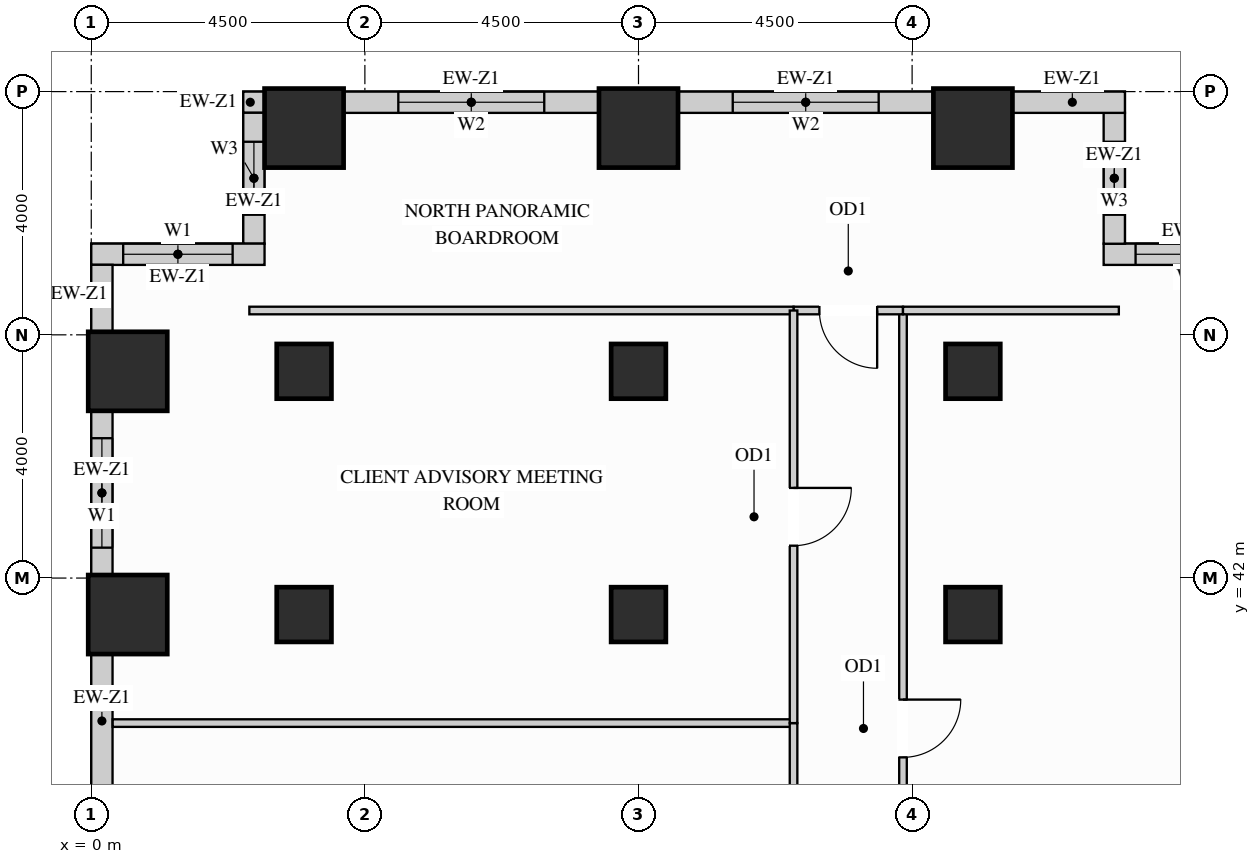
"""IFC4 building model, lengths in metres.
Left out: names, types, materials, properties, quantities, classifications, styles, units other than length and angle.
Written with IfcOpenShell. Run it as: python <this file> out.ifc"""

import sys

from ifc_helpers import new_model, si_unit, direction, frame, frame_2d, origin, origin_2d, place, context, subcontext, project, spatial, rectangle, extrude, source, transform, mapped, element, fill, save


model = new_model("IFC4")
c1 = context("Model", 3, precision=1e-05, world=origin(), true_north=direction((0.0, 1.0)))
c2 = subcontext(c1, "Body", "Model", "MODEL_VIEW")
j1 = project(units=[si_unit("LENGTHUNIT", "METRE"), si_unit("PLANEANGLEUNIT", "RADIAN")], contexts=[c1])
p1 = place(None, origin())
s1 = spatial("IfcSite", under=j1, at=p1, CompositionType="ELEMENT")
p2 = place(p1, origin())
s2 = spatial("IfcBuilding", under=s1, at=p2, CompositionType="ELEMENT")
p3 = place(p2, frame((0.0, 0.0, 62.1)))
s3 = spatial("IfcBuildingStorey", under=s2, at=p3, CompositionType="ELEMENT", Elevation=62.1)
m1 = source(origin(), c2, "Body", "SweptSolid", [
    extrude(rectangle(XDim=0.9, YDim=0.9, at=origin_2d()), origin(), (0.0, 0.0, 1.0), 3.38),
])
for number, where, z_axis, x_axis in (
    (1, (14.5, 41.4, 0.0), (0.0, 0.0, 1.0), (1.0, 0.0, 0.0)),
    (2, (14.5, 45.4, 0.0), (0.0, 0.0, 1.0), (1.0, 0.0, 0.0)),
    (3, (3.5, 41.4, 0.0), (0.0, 0.0, 1.0), (1.0, 0.0, 0.0)),
    (4, (3.5, 45.4, 0.0), (0.0, 0.0, 1.0), (1.0, 0.0, 0.0)),
    (5, (9.0, 41.4, 0.0), (0.0, 0.0, 1.0), (1.0, 0.0, 0.0)),
    (6, (9.0, 45.4, 0.0), (0.0, 0.0, 1.0), (1.0, 0.0, 0.0)),
):
    element("IfcColumn", number, at=place(p3, frame(where, z_axis=z_axis, x_axis=x_axis)), inside=s3, PredefinedType="COLUMN", context=c2, shape_type="MappedRepresentation", body=[
        mapped(m1, transform((0.0, 0.0, 0.0), x_axis=(1.0, 0.0, 0.0), y_axis=(0.0, 1.0, 0.0), z_axis=(0.0, 0.0, 1.0))),
    ])
m2 = source(origin(), c2, "Body", "SweptSolid", [
    extrude(rectangle(XDim=1.3, YDim=1.3, at=origin_2d()), origin(), (0.0, 0.0, 1.0), 3.38),
])
for number, where, z_axis, x_axis in (
    (7, (14.5, 49.4, 0.0), (0.0, 0.0, 1.0), (1.0, 0.0, 0.0)),
    (8, (3.5, 49.4, 0.0), (0.0, 0.0, 1.0), (1.0, 0.0, 0.0)),
    (9, (9.0, 49.4, 0.0), (0.0, 0.0, 1.0), (1.0, 0.0, 0.0)),
    (10, (0.6, 41.4, 0.0), (0.0, 0.0, 1.0), (1.0, 0.0, 0.0)),
    (11, (0.6, 45.4, 0.0), (0.0, 0.0, 1.0), (1.0, 0.0, 0.0)),
):
    element("IfcColumn", number, at=place(p3, frame(where, z_axis=z_axis, x_axis=x_axis)), inside=s3, PredefinedType="COLUMN", context=c2, shape_type="MappedRepresentation", body=[
        mapped(m2, transform((0.0, 0.0, 0.0), x_axis=(1.0, 0.0, 0.0), y_axis=(0.0, 1.0, 0.0), z_axis=(0.0, 0.0, 1.0))),
    ])
p4 = place(p3, frame((19.5, 47.325, 0.0), z_axis=(0.0, 0.0, 1.0), x_axis=(-1.0, 0.0, 0.0)))
e12 = element("IfcWall", 12, at=p4, inside=s3, PredefinedType="SOLIDWALL", context=c2, shape_type="SweptSolid", body=[
    extrude(rectangle(XDim=2.85, YDim=0.35, at=frame_2d((1.425, 0.0))), origin(), (0.0, 0.0, 1.0), 3.365),
])
p5 = place(p4, frame((0.525, 0.0, 0.78)))
e13 = element("IfcOpeningElement", 13, at=p5, cuts=e12, PredefinedType="OPENING", context=c2, shape_type="SweptSolid", body=[
    extrude(rectangle(XDim=1.8, YDim=2.1, at=frame_2d((0.9, 1.05))), frame((0.0, 0.185, 0.0), z_axis=(0.0, -1.0, 0.0), x_axis=(1.0, 0.0, 0.0)), (0.0, 0.0, 1.0), 0.37),
])
p6 = place(p3, frame((16.825, 47.498, 0.0), z_axis=(0.0, 0.0, 1.0), x_axis=(0.0, 1.0, 0.0)))
e14 = element("IfcWall", 14, at=p6, inside=s3, PredefinedType="SOLIDWALL", context=c2, shape_type="SweptSolid", body=[
    extrude(rectangle(XDim=2.154, YDim=0.35, at=frame_2d((1.077, 0.0))), origin(), (0.0, 0.0, 1.0), 3.365),
])
p7 = place(p6, frame((0.477, 0.0, 0.78)))
e15 = element("IfcOpeningElement", 15, at=p7, cuts=e14, PredefinedType="OPENING", context=c2, shape_type="SweptSolid", body=[
    extrude(rectangle(XDim=1.2, YDim=2.1, at=frame_2d((0.6, 1.05))), frame((0.0, 0.185, 0.0), z_axis=(0.0, -1.0, 0.0), x_axis=(1.0, 0.0, 0.0)), (0.0, 0.0, 1.0), 0.37),
])
m3 = source(origin(), c2, "Body", "SweptSolid", [
    extrude(rectangle(XDim=1.852, YDim=0.35, at=frame_2d((0.926, 0.0))), origin(), (0.0, 0.0, 1.0), 3.365),
])
p8 = place(p3, frame((17.0, 49.825, 0.0), z_axis=(0.0, 0.0, 1.0), x_axis=(-1.0, 0.0, 0.0)))
e16 = element("IfcWall", 16, at=p8, inside=s3, PredefinedType="SOLIDWALL", context=c2, shape_type="MappedRepresentation", body=[
    mapped(m3, transform((0.0, 0.0, 0.0), x_axis=(1.0, 0.0, 0.0), y_axis=(0.0, 1.0, 0.0), z_axis=(0.0, 0.0, 1.0))),
])
p9 = place(p3, frame((13.852, 49.825, 0.0), z_axis=(0.0, 0.0, 1.0), x_axis=(-1.0, 0.0, 0.0)))
e17 = element("IfcWall", 17, at=p9, inside=s3, PredefinedType="SOLIDWALL", context=c2, shape_type="SweptSolid", body=[
    extrude(rectangle(XDim=4.204, YDim=0.35, at=frame_2d((2.102, 0.0))), origin(), (0.0, 0.0, 1.0), 2.51),
])
p10 = place(p9, frame((0.902, 0.0, 0.78)))
e18 = element("IfcOpeningElement", 18, at=p10, cuts=e17, PredefinedType="OPENING", context=c2, shape_type="SweptSolid", body=[
    extrude(rectangle(XDim=2.4, YDim=1.55, at=frame_2d((1.2, 0.775))), frame((0.0, 0.185, 0.0), z_axis=(0.0, -1.0, 0.0), x_axis=(1.0, 0.0, 0.0)), (0.0, 0.0, 1.0), 0.37),
])
p11 = place(p3, frame((8.352, 49.825, 0.0), z_axis=(0.0, 0.0, 1.0), x_axis=(-1.0, 0.0, 0.0)))
e19 = element("IfcWall", 19, at=p11, inside=s3, PredefinedType="SOLIDWALL", context=c2, shape_type="SweptSolid", body=[
    extrude(rectangle(XDim=4.204, YDim=0.35, at=frame_2d((2.102, 0.0))), origin(), (0.0, 0.0, 1.0), 2.51),
])
p12 = place(p11, frame((0.902, 0.0, 0.78)))
e20 = element("IfcOpeningElement", 20, at=p12, cuts=e19, PredefinedType="OPENING", context=c2, shape_type="SweptSolid", body=[
    extrude(rectangle(XDim=2.4, YDim=1.55, at=frame_2d((1.2, 0.775))), frame((0.0, 0.185, 0.0), z_axis=(0.0, -1.0, 0.0), x_axis=(1.0, 0.0, 0.0)), (0.0, 0.0, 1.0), 0.37),
])
m4 = source(origin(), c2, "Body", "SweptSolid", [
    extrude(rectangle(XDim=0.352, YDim=0.35, at=frame_2d((0.176, 0.0))), origin(), (0.0, 0.0, 1.0), 3.365),
])
p13 = place(p3, frame((2.852, 49.825, 0.0), z_axis=(0.0, 0.0, 1.0), x_axis=(-1.0, 0.0, 0.0)))
e21 = element("IfcWall", 21, at=p13, inside=s3, PredefinedType="SOLIDWALL", context=c2, shape_type="MappedRepresentation", body=[
    mapped(m4, transform((0.0, 0.0, 0.0), x_axis=(1.0, 0.0, 0.0), y_axis=(0.0, 1.0, 0.0), z_axis=(0.0, 0.0, 1.0))),
])
p14 = place(p3, frame((2.675, 49.652, 0.0), z_axis=(0.0, 0.0, 1.0), x_axis=(0.0, -1.0, 0.0)))
e22 = element("IfcWall", 22, at=p14, inside=s3, PredefinedType="SOLIDWALL", context=c2, shape_type="SweptSolid", body=[
    extrude(rectangle(XDim=2.154, YDim=0.35, at=frame_2d((1.077, 0.0))), origin(), (0.0, 0.0, 1.0), 3.365),
])
p15 = place(p14, frame((0.477, 0.0, 0.78)))
e23 = element("IfcOpeningElement", 23, at=p15, cuts=e22, PredefinedType="OPENING", context=c2, shape_type="SweptSolid", body=[
    extrude(rectangle(XDim=1.2, YDim=2.1, at=frame_2d((0.6, 1.05))), frame((0.0, 0.185, 0.0), z_axis=(0.0, -1.0, 0.0), x_axis=(1.0, 0.0, 0.0)), (0.0, 0.0, 1.0), 0.37),
])
p16 = place(p3, frame((2.85, 47.325, 0.0), z_axis=(0.0, 0.0, 1.0), x_axis=(-1.0, 0.0, 0.0)))
e24 = element("IfcWall", 24, at=p16, inside=s3, PredefinedType="SOLIDWALL", context=c2, shape_type="SweptSolid", body=[
    extrude(rectangle(XDim=2.85, YDim=0.35, at=frame_2d((1.425, 0.0))), origin(), (0.0, 0.0, 1.0), 3.365),
])
p17 = place(p16, frame((0.525, 0.0, 0.78)))
e25 = element("IfcOpeningElement", 25, at=p17, cuts=e24, PredefinedType="OPENING", context=c2, shape_type="SweptSolid", body=[
    extrude(rectangle(XDim=1.8, YDim=2.1, at=frame_2d((0.9, 1.05))), frame((0.0, 0.185, 0.0), z_axis=(0.0, -1.0, 0.0), x_axis=(1.0, 0.0, 0.0)), (0.0, 0.0, 1.0), 0.37),
])
m5 = source(origin(), c2, "Body", "SweptSolid", [
    extrude(rectangle(XDim=1.104, YDim=0.35, at=frame_2d((0.552, 0.0))), origin(), (0.0, 0.0, 1.0), 3.365),
])
p18 = place(p3, frame((0.175, 47.152, 0.0), z_axis=(0.0, 0.0, 1.0), x_axis=(0.0, -1.0, 0.0)))
e26 = element("IfcWall", 26, at=p18, inside=s3, PredefinedType="SOLIDWALL", context=c2, shape_type="MappedRepresentation", body=[
    mapped(m5, transform((0.0, 0.0, 0.0), x_axis=(1.0, 0.0, 0.0), y_axis=(0.0, 1.0, 0.0), z_axis=(0.0, 0.0, 1.0))),
])
p19 = place(p3, frame((0.175, 44.752, 0.0), z_axis=(0.0, 0.0, 1.0), x_axis=(0.0, -1.0, 0.0)))
e27 = element("IfcWall", 27, at=p19, inside=s3, PredefinedType="SOLIDWALL", context=c2, shape_type="SweptSolid", body=[
    extrude(rectangle(XDim=2.704, YDim=0.35, at=frame_2d((1.352, 0.0))), origin(), (0.0, 0.0, 1.0), 2.51),
])
p20 = place(p19, frame((0.452, 0.0, 0.78)))
e28 = element("IfcOpeningElement", 28, at=p20, cuts=e27, PredefinedType="OPENING", context=c2, shape_type="SweptSolid", body=[
    extrude(rectangle(XDim=1.8, YDim=1.55, at=frame_2d((0.9, 0.775))), frame((0.0, 0.185, 0.0), z_axis=(0.0, -1.0, 0.0), x_axis=(1.0, 0.0, 0.0)), (0.0, 0.0, 1.0), 0.37),
])
m6 = source(origin(), c2, "Body", "SweptSolid", [
    extrude(rectangle(XDim=2.204, YDim=0.35, at=frame_2d((1.102, 0.0))), origin(), (0.0, 0.0, 1.0), 2.51),
])
p21 = place(p3, frame((0.175, 40.752, 0.0), z_axis=(0.0, 0.0, 1.0), x_axis=(0.0, -1.0, 0.0)))
e29 = element("IfcWall", 29, at=p21, inside=s3, PredefinedType="SOLIDWALL", context=c2, shape_type="MappedRepresentation", body=[
    mapped(m6, transform((0.0, 0.0, 0.0), x_axis=(1.0, 0.0, 0.0), y_axis=(0.0, 1.0, 0.0), z_axis=(0.0, 0.0, 1.0))),
])
m7 = source(origin(), c2, "Body", "SweptSolid", [
    extrude(rectangle(XDim=11.198, YDim=0.125, at=frame_2d((5.599, 0.0))), origin(), (0.0, 0.0, 1.0), 2.828),
])
p22 = place(p3, frame((0.352, 39.615, 0.0), z_axis=(0.0, 0.0, 1.0), x_axis=(1.0, 0.0, 0.0)))
e30 = element("IfcWall", 30, at=p22, inside=s3, PredefinedType="PARTITIONING", context=c2, shape_type="MappedRepresentation", body=[
    mapped(m7, transform((0.0, 0.0, 0.0), x_axis=(1.0, 0.0, 0.0), y_axis=(0.0, 1.0, 0.0), z_axis=(0.0, 0.0, 1.0))),
])
p23 = place(p3, frame((13.35, 31.65, 0.0), z_axis=(0.0, 0.0, 1.0), x_axis=(0.0, 1.0, 0.0)))
e31 = element("IfcWall", 31, at=p23, inside=s3, PredefinedType="PARTITIONING", context=c2, shape_type="SweptSolid", body=[
    extrude(rectangle(XDim=14.75, YDim=0.125, at=frame_2d((7.375, 0.0))), origin(), (0.0, 0.0, 1.0), 3.365),
])
p24 = place(p23, frame((7.402, 0.0, 0.0)))
e32 = element("IfcOpeningElement", 32, at=p24, cuts=e31, PredefinedType="OPENING", context=c2, shape_type="SweptSolid", body=[
    extrude(rectangle(XDim=0.95, YDim=2.15, at=frame_2d((0.475, 1.075))), frame((0.0, 0.073, 0.0), z_axis=(0.0, -1.0, 0.0), x_axis=(1.0, 0.0, 0.0)), (0.0, 0.0, 1.0), 0.145),
])
p25 = place(p3, frame((11.55, 46.4, 0.0), z_axis=(0.0, 0.0, 1.0), x_axis=(1.0, 0.0, 0.0)))
e33 = element("IfcWall", 33, at=p25, inside=s3, PredefinedType="PARTITIONING", context=c2, shape_type="SweptSolid", body=[
    extrude(rectangle(XDim=1.8, YDim=0.125, at=frame_2d((0.9, 0.0))), origin(), (0.0, 0.0, 1.0), 3.365),
])
p26 = place(p25, frame((0.425, 0.0, 0.0)))
e34 = element("IfcOpeningElement", 34, at=p26, cuts=e33, PredefinedType="OPENING", context=c2, shape_type="SweptSolid", body=[
    extrude(rectangle(XDim=0.95, YDim=2.15, at=frame_2d((0.475, 1.075))), frame((0.0, 0.073, 0.0), z_axis=(0.0, -1.0, 0.0), x_axis=(1.0, 0.0, 0.0)), (0.0, 0.0, 1.0), 0.145),
])
m8 = source(origin(), c2, "Body", "SweptSolid", [
    extrude(rectangle(XDim=3.55, YDim=0.125, at=frame_2d((1.775, 0.0))), origin(), (0.0, 0.0, 1.0), 3.365),
])
p27 = place(p3, frame((13.35, 46.4, 0.0), z_axis=(0.0, 0.0, 1.0), x_axis=(1.0, 0.0, 0.0)))
e35 = element("IfcWall", 35, at=p27, inside=s3, PredefinedType="PARTITIONING", context=c2, shape_type="MappedRepresentation", body=[
    mapped(m8, transform((0.0, 0.0, 0.0), x_axis=(1.0, 0.0, 0.0), y_axis=(0.0, 1.0, 0.0), z_axis=(0.0, 0.0, 1.0))),
])
m9 = source(origin(), c2, "Body", "SweptSolid", [
    extrude(rectangle(XDim=8.95, YDim=0.125, at=frame_2d((4.475, 0.0))), origin(), (0.0, 0.0, 1.0), 3.365),
])
p28 = place(p3, frame((2.6, 46.4, 0.0), z_axis=(0.0, 0.0, 1.0), x_axis=(1.0, 0.0, 0.0)))
e36 = element("IfcWall", 36, at=p28, inside=s3, PredefinedType="PARTITIONING", context=c2, shape_type="MappedRepresentation", body=[
    mapped(m9, transform((0.0, 0.0, 0.0), x_axis=(1.0, 0.0, 0.0), y_axis=(0.0, 1.0, 0.0), z_axis=(0.0, 0.0, 1.0))),
])
p29 = place(p3, frame((11.55, 31.65, 0.0), z_axis=(0.0, 0.0, 1.0), x_axis=(0.0, 1.0, 0.0)))
e37 = element("IfcWall", 37, at=p29, inside=s3, PredefinedType="PARTITIONING", context=c2, shape_type="SweptSolid", body=[
    extrude(rectangle(XDim=7.965, YDim=0.125, at=frame_2d((3.982, 0.0))), origin(), (0.0, 0.0, 1.0), 3.365),
])
p30 = place(p29, frame((3.508, 0.0, 0.0)))
e38 = element("IfcOpeningElement", 38, at=p30, cuts=e37, PredefinedType="OPENING", context=c2, shape_type="SweptSolid", body=[
    extrude(rectangle(XDim=0.95, YDim=2.15, at=frame_2d((0.475, 1.075))), frame((0.0, 0.073, 0.0), z_axis=(0.0, -1.0, 0.0), x_axis=(1.0, 0.0, 0.0)), (0.0, 0.0, 1.0), 0.145),
])
p31 = place(p3, frame((11.55, 39.615, 0.0), z_axis=(0.0, 0.0, 1.0), x_axis=(0.0, 1.0, 0.0)))
e39 = element("IfcWall", 39, at=p31, inside=s3, PredefinedType="PARTITIONING", context=c2, shape_type="SweptSolid", body=[
    extrude(rectangle(XDim=6.785, YDim=0.125, at=frame_2d((3.393, 0.0))), origin(), (0.0, 0.0, 1.0), 3.365),
])
p32 = place(p31, frame((2.917, 0.0, 0.0)))
e40 = element("IfcOpeningElement", 40, at=p32, cuts=e39, PredefinedType="OPENING", context=c2, shape_type="SweptSolid", body=[
    extrude(rectangle(XDim=0.95, YDim=2.15, at=frame_2d((0.475, 1.075))), frame((0.0, 0.073, 0.0), z_axis=(0.0, -1.0, 0.0), x_axis=(1.0, 0.0, 0.0)), (0.0, 0.0, 1.0), 0.145),
])
m10 = source(origin(), c2, "Body", "SweptSolid", [
    extrude(rectangle(XDim=0.95, YDim=2.15, at=frame_2d((0.475, 1.075))), frame((0.0, 0.025, 0.0), z_axis=(0.0, -1.0, 0.0), x_axis=(1.0, 0.0, 0.0)), (0.0, 0.0, 1.0), 0.05),
])
p33 = place(p24, origin())
e41 = element("IfcDoor", 41, at=p33, inside=s3, OperationType="SINGLE_SWING_RIGHT", PredefinedType="DOOR", context=c2, shape_type="MappedRepresentation", body=[
    mapped(m10, transform((0.0, 0.0, 0.0), x_axis=(1.0, 0.0, 0.0), y_axis=(0.0, 1.0, 0.0), z_axis=(0.0, 0.0, 1.0))),
])
fill(e32, e41)
p34 = place(p26, origin())
e42 = element("IfcDoor", 42, at=p34, inside=s3, OperationType="SINGLE_SWING_RIGHT", PredefinedType="DOOR", context=c2, shape_type="MappedRepresentation", body=[
    mapped(m10, transform((0.0, 0.0, 0.0), x_axis=(1.0, 0.0, 0.0), y_axis=(0.0, 1.0, 0.0), z_axis=(0.0, 0.0, 1.0))),
])
fill(e34, e42)
p35 = place(p32, origin())
e43 = element("IfcDoor", 43, at=p35, inside=s3, OperationType="SINGLE_SWING_RIGHT", PredefinedType="DOOR", context=c2, shape_type="MappedRepresentation", body=[
    mapped(m10, transform((0.0, 0.0, 0.0), x_axis=(1.0, 0.0, 0.0), y_axis=(0.0, 1.0, 0.0), z_axis=(0.0, 0.0, 1.0))),
])
fill(e40, e43)
m11 = source(origin(), c2, "Body", "SweptSolid", [
    extrude(rectangle(XDim=1.8, YDim=2.1, at=frame_2d((0.9, 1.05))), frame((0.0, 0.03, 0.0), z_axis=(0.0, -1.0, 0.0), x_axis=(1.0, 0.0, 0.0)), (0.0, 0.0, 1.0), 0.06),
])
p36 = place(p5, origin())
e44 = element("IfcWindow", 44, at=p36, inside=s3, PartitioningType="SINGLE_PANEL", PredefinedType="WINDOW", context=c2, shape_type="MappedRepresentation", body=[
    mapped(m11, transform((0.0, 0.0, 0.0), x_axis=(1.0, 0.0, 0.0), y_axis=(0.0, 1.0, 0.0), z_axis=(0.0, 0.0, 1.0))),
])
fill(e13, e44)
p37 = place(p17, origin())
e45 = element("IfcWindow", 45, at=p37, inside=s3, PartitioningType="SINGLE_PANEL", PredefinedType="WINDOW", context=c2, shape_type="MappedRepresentation", body=[
    mapped(m11, transform((0.0, 0.0, 0.0), x_axis=(1.0, 0.0, 0.0), y_axis=(0.0, 1.0, 0.0), z_axis=(0.0, 0.0, 1.0))),
])
fill(e25, e45)
m12 = source(origin(), c2, "Body", "SweptSolid", [
    extrude(rectangle(XDim=1.8, YDim=1.55, at=frame_2d((0.9, 0.775))), frame((0.0, 0.03, 0.0), z_axis=(0.0, -1.0, 0.0), x_axis=(1.0, 0.0, 0.0)), (0.0, 0.0, 1.0), 0.06),
])
p38 = place(p20, origin())
e46 = element("IfcWindow", 46, at=p38, inside=s3, PartitioningType="SINGLE_PANEL", PredefinedType="WINDOW", context=c2, shape_type="MappedRepresentation", body=[
    mapped(m12, transform((0.0, 0.0, 0.0), x_axis=(1.0, 0.0, 0.0), y_axis=(0.0, 1.0, 0.0), z_axis=(0.0, 0.0, 1.0))),
])
fill(e28, e46)
m13 = source(origin(), c2, "Body", "SweptSolid", [
    extrude(rectangle(XDim=2.4, YDim=1.55, at=frame_2d((1.2, 0.775))), frame((0.0, 0.03, 0.0), z_axis=(0.0, -1.0, 0.0), x_axis=(1.0, 0.0, 0.0)), (0.0, 0.0, 1.0), 0.06),
])
p39 = place(p10, origin())
e47 = element("IfcWindow", 47, at=p39, inside=s3, PartitioningType="SINGLE_PANEL", PredefinedType="WINDOW", context=c2, shape_type="MappedRepresentation", body=[
    mapped(m13, transform((0.0, 0.0, 0.0), x_axis=(1.0, 0.0, 0.0), y_axis=(0.0, 1.0, 0.0), z_axis=(0.0, 0.0, 1.0))),
])
fill(e18, e47)
p40 = place(p12, origin())
e48 = element("IfcWindow", 48, at=p40, inside=s3, PartitioningType="SINGLE_PANEL", PredefinedType="WINDOW", context=c2, shape_type="MappedRepresentation", body=[
    mapped(m13, transform((0.0, 0.0, 0.0), x_axis=(1.0, 0.0, 0.0), y_axis=(0.0, 1.0, 0.0), z_axis=(0.0, 0.0, 1.0))),
])
fill(e20, e48)
m14 = source(origin(), c2, "Body", "SweptSolid", [
    extrude(rectangle(XDim=1.2, YDim=2.1, at=frame_2d((0.6, 1.05))), frame((0.0, 0.03, 0.0), z_axis=(0.0, -1.0, 0.0), x_axis=(1.0, 0.0, 0.0)), (0.0, 0.0, 1.0), 0.06),
])
p41 = place(p7, origin())
e49 = element("IfcWindow", 49, at=p41, inside=s3, PartitioningType="SINGLE_PANEL", PredefinedType="WINDOW", context=c2, shape_type="MappedRepresentation", body=[
    mapped(m14, transform((0.0, 0.0, 0.0), x_axis=(1.0, 0.0, 0.0), y_axis=(0.0, 1.0, 0.0), z_axis=(0.0, 0.0, 1.0))),
])
fill(e15, e49)
p42 = place(p15, origin())
e50 = element("IfcWindow", 50, at=p42, inside=s3, PartitioningType="SINGLE_PANEL", PredefinedType="WINDOW", context=c2, shape_type="MappedRepresentation", body=[
    mapped(m14, transform((0.0, 0.0, 0.0), x_axis=(1.0, 0.0, 0.0), y_axis=(0.0, 1.0, 0.0), z_axis=(0.0, 0.0, 1.0))),
])
fill(e23, e50)
save(model, sys.argv[1])
